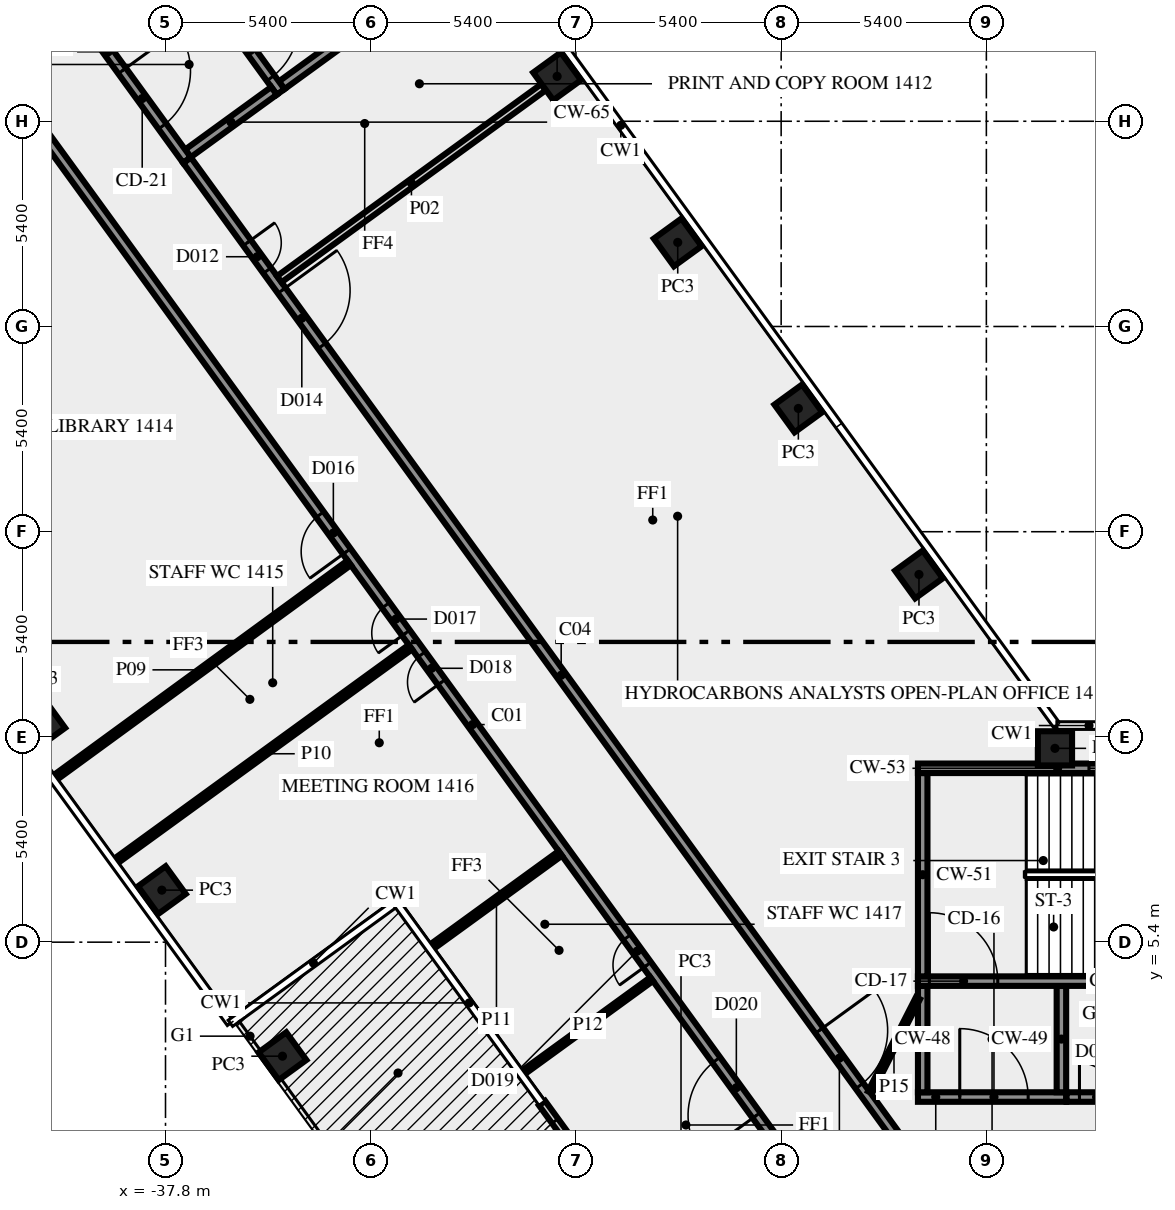
"""IFC4 building model, lengths in metres.
Left out: names, types, materials, properties, quantities, classifications, styles, units other than length and angle.
Written with IfcOpenShell. Run it as: python <this file> out.ifc"""

import sys

from ifc_helpers import new_model, si_unit, direction, frame, frame_2d, origin, origin_2d, place, context, subcontext, project, spatial, rectangle, extrude, element, fill, save


model = new_model("IFC4")
c1 = context("Model", 3, precision=1e-05, world=origin(), true_north=direction((0.0, 1.0)))
c2 = subcontext(c1, "Body", "Model", "MODEL_VIEW")
j1 = project(units=[si_unit("LENGTHUNIT", "METRE"), si_unit("PLANEANGLEUNIT", "RADIAN")], contexts=[c1])
p1 = place(None, origin())
s1 = spatial("IfcSite", under=j1, at=p1, CompositionType="ELEMENT")
p2 = place(p1, origin())
s2 = spatial("IfcBuilding", under=s1, at=p2, CompositionType="ELEMENT")
p3 = place(p2, frame((0.0, 0.0, 63.0)))
s3 = spatial("IfcBuildingStorey", under=s2, at=p3, CompositionType="ELEMENT", Elevation=63.0)
for number, where, z_axis, x_axis in (
    (1, (-17.974, 15.075, 0.0), (0.0, 0.0, 1.0), (-0.588, 0.809, 0.0)),
    (2, (-21.147, 19.444, 0.0), (0.0, 0.0, 1.0), (-0.588, 0.809, 0.0)),
    (3, (-24.321, 23.812, 0.0), (0.0, 0.0, 1.0), (-0.588, 0.809, 0.0)),
    (4, (-27.495, 28.181, 0.0), (0.0, 0.0, 1.0), (-0.588, 0.809, 0.0)),
    (5, (-41.07, 11.137, 0.0), (0.0, 0.0, 1.0), (0.588, -0.809, 0.0)),
    (6, (-37.896, 6.769, 0.0), (0.0, 0.0, 1.0), (0.588, -0.809, 0.0)),
    (7, (-34.722, 2.4, 0.0), (0.0, 0.0, 1.0), (0.588, -0.809, 0.0)),
    (8, (-14.395, 10.5, 0.0), (0.0, 0.0, 1.0), (-1.0, 0.0, 0.0)),
):
    element("IfcColumn", number, at=place(p3, frame(where, z_axis=z_axis, x_axis=x_axis)), inside=s3, PredefinedType="COLUMN", context=c2, shape_type="SweptSolid", body=[
        extrude(rectangle(XDim=0.9, YDim=0.9, at=origin_2d()), origin(), (0.0, 0.0, 1.0), 3.65),
    ])
p4 = place(p3, frame((-26.15, -1.232, 0.0), z_axis=(0.0, 0.0, 1.0), x_axis=(-0.58782869016, 0.808985433135, 0.0)))
e9 = element("IfcWall", 9, at=p4, inside=s3, PredefinedType="SOLIDWALL", context=c2, shape_type="SweptSolid", body=[
    extrude(rectangle(XDim=2.963, YDim=0.2, at=frame_2d((1.481, 0.0))), origin(), (0.0, 0.0, 1.0), 3.65),
])
p5 = place(p4, frame((0.582, 0.0, 0.0)))
e10 = element("IfcOpeningElement", 10, at=p5, cuts=e9, PredefinedType="OPENING", context=c2, shape_type="SweptSolid", body=[
    extrude(rectangle(XDim=1.8, YDim=2.4, at=frame_2d((0.9, 1.2))), frame((0.0, 0.11, 0.0), z_axis=(0.0, -1.0, 0.0), x_axis=(1.0, 0.0, 0.0)), (0.0, 0.0, 1.0), 0.22),
])
p6 = place(p3, frame((-18.0, 1.325, 0.0), z_axis=(0.0, 0.0, 1.0), x_axis=(1.0, 0.0, 0.0)))
e11 = element("IfcWall", 11, at=p6, inside=s3, PredefinedType="SHEAR", context=c2, shape_type="SweptSolid", body=[
    extrude(rectangle(XDim=3.9, YDim=0.25, at=frame_2d((1.95, 0.0))), origin(), (0.0, 0.0, 1.0), 3.65),
])
p7 = place(p6, frame((1.1, 0.0, 0.0)))
e12 = element("IfcOpeningElement", 12, at=p7, cuts=e11, PredefinedType="OPENING", context=c2, shape_type="SweptSolid", body=[
    extrude(rectangle(XDim=1.8, YDim=2.1, at=frame_2d((0.9, 1.05))), frame((0.0, 0.135, 0.0), z_axis=(0.0, -1.0, 0.0), x_axis=(1.0, 0.0, 0.0)), (0.0, 0.0, 1.0), 0.27),
])
for number, where, z_axis, x_axis in (
    (13, (-17.875, 1.45, 0.0), (0.0, 0.0, 1.0), (0.0, 1.0, 0.0)),
    (14, (-14.225, 1.45, 0.0), (0.0, 0.0, 1.0), (0.0, 1.0, 0.0)),
):
    element("IfcWall", number, at=place(p3, frame(where, z_axis=z_axis, x_axis=x_axis)), inside=s3, PredefinedType="SHEAR", context=c2, shape_type="SweptSolid", body=[
        extrude(rectangle(XDim=2.8, YDim=0.25, at=frame_2d((1.4, 0.0))), origin(), (0.0, 0.0, 1.0), 3.65),
    ])
p8 = place(p3, frame((-18.0, 4.375, 0.0), z_axis=(0.0, 0.0, 1.0), x_axis=(1.0, 0.0, 0.0)))
e15 = element("IfcWall", 15, at=p8, inside=s3, PredefinedType="SHEAR", context=c2, shape_type="SweptSolid", body=[
    extrude(rectangle(XDim=10.5, YDim=0.25, at=frame_2d((5.25, 0.0))), origin(), (0.0, 0.0, 1.0), 3.65),
])
p9 = place(p8, frame((0.3, 0.0, 0.0)))
e16 = element("IfcOpeningElement", 16, at=p9, cuts=e15, PredefinedType="OPENING", context=c2, shape_type="SweptSolid", body=[
    extrude(rectangle(XDim=1.8, YDim=2.1, at=frame_2d((0.9, 1.05))), frame((0.0, 0.135, 0.0), z_axis=(0.0, -1.0, 0.0), x_axis=(1.0, 0.0, 0.0)), (0.0, 0.0, 1.0), 0.27),
])
p10 = place(p3, frame((-17.875, 4.5, 0.0), z_axis=(0.0, 0.0, 1.0), x_axis=(0.0, 1.0, 0.0)))
e17 = element("IfcWall", 17, at=p10, inside=s3, PredefinedType="SHEAR", context=c2, shape_type="SweptSolid", body=[
    extrude(rectangle(XDim=5.35, YDim=0.25, at=frame_2d((2.675, 0.0))), origin(), (0.0, 0.0, 1.0), 3.65),
])
p11 = place(p3, frame((-18.0, 9.975, 0.0), z_axis=(0.0, 0.0, 1.0), x_axis=(1.0, 0.0, 0.0)))
e18 = element("IfcWall", 18, at=p11, inside=s3, PredefinedType="SHEAR", context=c2, shape_type="SweptSolid", body=[
    extrude(rectangle(XDim=10.5, YDim=0.25, at=frame_2d((5.25, 0.0))), origin(), (0.0, 0.0, 1.0), 3.65),
])
p12 = place(p11, frame((4.5, 0.0, 1.0)))
e19 = element("IfcOpeningElement", 19, at=p12, cuts=e18, PredefinedType="OPENING", context=c2, shape_type="SweptSolid", body=[
    extrude(rectangle(XDim=1.2, YDim=1.2, at=frame_2d((0.6, 0.6))), frame((0.0, 0.135, 0.0), z_axis=(0.0, -1.0, 0.0), x_axis=(1.0, 0.0, 0.0)), (0.0, 0.0, 1.0), 0.27),
])
p13 = place(p3, frame((-30.414, 31.092, 0.0), z_axis=(0.0, 0.0, 1.0), x_axis=(-0.8089984606, -0.587810760999, 0.0)))
e20 = element("IfcWall", 20, at=p13, inside=s3, PredefinedType="SHEAR", context=c2, shape_type="SweptSolid", body=[
    extrude(rectangle(XDim=5.35, YDim=0.25, at=frame_2d((2.675, 0.0))), origin(), (0.0, 0.0, 1.0), 3.65),
])
p14 = place(p3, frame((-40.942, 36.267, 0.0), z_axis=(0.0, 0.0, 1.0), x_axis=(0.587795589702, -0.809009483706, 0.0)))
e21 = element("IfcWall", 21, at=p14, inside=s3, PredefinedType="SHEAR", context=c2, shape_type="SweptSolid", body=[
    extrude(rectangle(XDim=10.5, YDim=0.25, at=frame_2d((5.25, 0.0))), origin(), (0.0, 0.0, 1.0), 3.65),
])
p15 = place(p14, frame((8.25, 0.0, 0.0)))
e22 = element("IfcOpeningElement", 22, at=p15, cuts=e21, PredefinedType="OPENING", context=c2, shape_type="SweptSolid", body=[
    extrude(rectangle(XDim=1.8, YDim=2.1, at=frame_2d((0.9, 1.05))), frame((0.0, 0.135, 0.0), z_axis=(0.0, -1.0, 0.0), x_axis=(1.0, 0.0, 0.0)), (0.0, 0.0, 1.0), 0.27),
])
p16 = place(p3, frame((-34.945, 27.8, 0.0), z_axis=(0.0, 0.0, 1.0), x_axis=(-0.809041377956, -0.587751689708, 0.0)))
e23 = element("IfcWall", 23, at=p16, inside=s3, PredefinedType="SHEAR", context=c2, shape_type="SweptSolid", body=[
    extrude(rectangle(XDim=2.8, YDim=0.25, at=frame_2d((1.4, 0.0))), origin(), (0.0, 0.0, 1.0), 3.65),
])
p17 = place(p3, frame((-39.589, 29.216, 0.0), z_axis=(0.0, 0.0, 1.0), x_axis=(0.587772420479, -0.809026317077, 0.0)))
e24 = element("IfcWall", 24, at=p17, inside=s3, PredefinedType="SHEAR", context=c2, shape_type="SweptSolid", body=[
    extrude(rectangle(XDim=4.0, YDim=0.25, at=frame_2d((2.0, 0.0))), origin(), (0.0, 0.0, 1.0), 3.65),
])
p18 = place(p17, frame((1.1, 0.0, 0.0)))
e25 = element("IfcOpeningElement", 25, at=p18, cuts=e24, PredefinedType="OPENING", context=c2, shape_type="SweptSolid", body=[
    extrude(rectangle(XDim=1.8, YDim=2.1, at=frame_2d((0.9, 1.05))), frame((0.0, 0.135, 0.0), z_axis=(0.0, -1.0, 0.0), x_axis=(1.0, 0.0, 0.0)), (0.0, 0.0, 1.0), 0.27),
])
p19 = place(p3, frame((-20.531, -1.523, 0.0), z_axis=(0.0, 0.0, 1.0), x_axis=(-0.587784593204, 0.809017473231, 0.0)))
e26 = element("IfcWall", 26, at=p19, inside=s3, PredefinedType="SOLIDWALL", context=c2, shape_type="SweptSolid", body=[
    extrude(rectangle(XDim=44.67, YDim=0.25, at=frame_2d((22.335, 0.0))), origin(), (0.0, 0.0, 1.0), 3.65),
])
p20 = place(p19, frame((43.046, 0.0, 0.0)))
e27 = element("IfcOpeningElement", 27, at=p20, cuts=e26, PredefinedType="OPENING", context=c2, shape_type="SweptSolid", body=[
    extrude(rectangle(XDim=1.2, YDim=2.1, at=frame_2d((0.6, 1.05))), frame((0.0, 0.135, 0.0), z_axis=(0.0, -1.0, 0.0), x_axis=(1.0, 0.0, 0.0)), (0.0, 0.0, 1.0), 0.27),
])
p21 = place(p19, frame((21.266, 0.0, 0.0)))
e28 = element("IfcOpeningElement", 28, at=p21, cuts=e26, PredefinedType="OPENING", context=c2, shape_type="SweptSolid", body=[
    extrude(rectangle(XDim=1.2, YDim=2.1, at=frame_2d((0.6, 1.05))), frame((0.0, 0.135, 0.0), z_axis=(0.0, -1.0, 0.0), x_axis=(1.0, 0.0, 0.0)), (0.0, 0.0, 1.0), 0.27),
])
p22 = place(p19, frame((17.015, 0.0, 0.0)))
e29 = element("IfcOpeningElement", 29, at=p22, cuts=e26, PredefinedType="OPENING", context=c2, shape_type="SweptSolid", body=[
    extrude(rectangle(XDim=0.9, YDim=2.1, at=frame_2d((0.45, 1.05))), frame((0.0, 0.135, 0.0), z_axis=(0.0, -1.0, 0.0), x_axis=(1.0, 0.0, 0.0)), (0.0, 0.0, 1.0), 0.27),
])
p23 = place(p19, frame((2.924, 0.0, 0.0)))
e30 = element("IfcOpeningElement", 30, at=p23, cuts=e26, PredefinedType="OPENING", context=c2, shape_type="SweptSolid", body=[
    extrude(rectangle(XDim=1.8, YDim=2.1, at=frame_2d((0.9, 1.05))), frame((0.0, 0.135, 0.0), z_axis=(0.0, -1.0, 0.0), x_axis=(1.0, 0.0, 0.0)), (0.0, 0.0, 1.0), 0.27),
])
p24 = place(p19, frame((18.616, 0.0, 0.0)))
e31 = element("IfcOpeningElement", 31, at=p24, cuts=e26, PredefinedType="OPENING", context=c2, shape_type="SweptSolid", body=[
    extrude(rectangle(XDim=0.9, YDim=2.1, at=frame_2d((0.45, 1.05))), frame((0.0, 0.135, 0.0), z_axis=(0.0, -1.0, 0.0), x_axis=(1.0, 0.0, 0.0)), (0.0, 0.0, 1.0), 0.27),
])
p25 = place(p19, frame((7.816, 0.0, 0.0)))
e32 = element("IfcOpeningElement", 32, at=p25, cuts=e26, PredefinedType="OPENING", context=c2, shape_type="SweptSolid", body=[
    extrude(rectangle(XDim=0.9, YDim=2.1, at=frame_2d((0.45, 1.05))), frame((0.0, 0.135, 0.0), z_axis=(0.0, -1.0, 0.0), x_axis=(1.0, 0.0, 0.0)), (0.0, 0.0, 1.0), 0.27),
])
p26 = place(p3, frame((-37.232, 25.972, 0.0), z_axis=(0.0, 0.0, 1.0), x_axis=(0.587786323093, -0.809016216391, 0.0)))
e33 = element("IfcWall", 33, at=p26, inside=s3, PredefinedType="SOLIDWALL", context=c2, shape_type="SweptSolid", body=[
    extrude(rectangle(XDim=33.493, YDim=0.25, at=frame_2d((16.747, 0.0))), origin(), (0.0, 0.0, 1.0), 3.65),
])
p27 = place(p26, frame((28.301, 0.0, 0.0)))
e34 = element("IfcOpeningElement", 34, at=p27, cuts=e33, PredefinedType="OPENING", context=c2, shape_type="SweptSolid", body=[
    extrude(rectangle(XDim=1.8, YDim=2.1, at=frame_2d((0.9, 1.05))), frame((0.0, 0.135, 0.0), z_axis=(0.0, -1.0, 0.0), x_axis=(1.0, 0.0, 0.0)), (0.0, 0.0, 1.0), 0.27),
])
p28 = place(p26, frame((4.235, 0.0, 0.0)))
e35 = element("IfcOpeningElement", 35, at=p28, cuts=e33, PredefinedType="OPENING", context=c2, shape_type="SweptSolid", body=[
    extrude(rectangle(XDim=1.8, YDim=2.1, at=frame_2d((0.9, 1.05))), frame((0.0, 0.135, 0.0), z_axis=(0.0, -1.0, 0.0), x_axis=(1.0, 0.0, 0.0)), (0.0, 0.0, 1.0), 0.27),
])
p29 = place(p26, frame((2.685, 0.0, 0.0)))
e36 = element("IfcOpeningElement", 36, at=p29, cuts=e33, PredefinedType="OPENING", context=c2, shape_type="SweptSolid", body=[
    extrude(rectangle(XDim=0.9, YDim=2.1, at=frame_2d((0.45, 1.05))), frame((0.0, 0.135, 0.0), z_axis=(0.0, -1.0, 0.0), x_axis=(1.0, 0.0, 0.0)), (0.0, 0.0, 1.0), 0.27),
])
p30 = place(p3, frame((-14.09, 1.325, 0.0), z_axis=(0.0, 0.0, 1.0), x_axis=(1.0, 0.0, 0.0)))
e37 = element("IfcWall", 37, at=p30, inside=s3, PredefinedType="SOLIDWALL", context=c2, shape_type="SweptSolid", body=[
    extrude(rectangle(XDim=28.18, YDim=0.25, at=frame_2d((14.09, 0.0))), origin(), (0.0, 0.0, 1.0), 3.65),
])
p31 = place(p30, frame((26.94, 0.0, 0.0)))
e38 = element("IfcOpeningElement", 38, at=p31, cuts=e37, PredefinedType="OPENING", context=c2, shape_type="SweptSolid", body=[
    extrude(rectangle(XDim=0.9, YDim=2.1, at=frame_2d((0.45, 1.05))), frame((0.0, 0.135, 0.0), z_axis=(0.0, -1.0, 0.0), x_axis=(1.0, 0.0, 0.0)), (0.0, 0.0, 1.0), 0.27),
])
p32 = place(p30, frame((0.34, 0.0, 0.0)))
e39 = element("IfcOpeningElement", 39, at=p32, cuts=e37, PredefinedType="OPENING", context=c2, shape_type="SweptSolid", body=[
    extrude(rectangle(XDim=0.9, YDim=2.1, at=frame_2d((0.45, 1.05))), frame((0.0, 0.135, 0.0), z_axis=(0.0, -1.0, 0.0), x_axis=(1.0, 0.0, 0.0)), (0.0, 0.0, 1.0), 0.27),
])
p33 = place(p30, frame((14.44, 0.0, 0.0)))
e40 = element("IfcOpeningElement", 40, at=p33, cuts=e37, PredefinedType="OPENING", context=c2, shape_type="SweptSolid", body=[
    extrude(rectangle(XDim=0.9, YDim=2.1, at=frame_2d((0.45, 1.05))), frame((0.0, 0.135, 0.0), z_axis=(0.0, -1.0, 0.0), x_axis=(1.0, 0.0, 0.0)), (0.0, 0.0, 1.0), 0.27),
])
p34 = place(p3, frame((-27.851, 27.897, 0.0), z_axis=(0.0, 0.0, 1.0), x_axis=(-0.809030728677, -0.587766348183, 0.0)))
e41 = element("IfcWall", 41, at=p34, inside=s3, PredefinedType="SOLIDWALL", context=c2, shape_type="SweptSolid", body=[
    extrude(rectangle(XDim=8.596, YDim=0.2, at=frame_2d((4.298, 0.0))), origin(), (0.0, 0.0, 1.0), 3.65),
])
p35 = place(p3, frame((-40.68, 9.75, 0.0), z_axis=(0.0, 0.0, 1.0), x_axis=(0.807645841498, 0.589667868135, 0.0)))
e42 = element("IfcWall", 42, at=p35, inside=s3, PredefinedType="PARTITIONING", context=c2, shape_type="SweptSolid", body=[
    extrude(rectangle(XDim=9.551, YDim=0.15, at=frame_2d((4.775, 0.0))), origin(), (0.0, 0.0, 1.0), 2.75),
])
p36 = place(p3, frame((-31.356, 13.164, 0.0), z_axis=(0.0, 0.0, 1.0), x_axis=(-0.809102944047, -0.587666934526, 0.0)))
e43 = element("IfcWall", 43, at=p36, inside=s3, PredefinedType="PARTITIONING", context=c2, shape_type="SweptSolid", body=[
    extrude(rectangle(XDim=9.55, YDim=0.15, at=frame_2d((4.775, 0.0))), origin(), (0.0, 0.0, 1.0), 2.75),
])
p37 = place(p3, frame((-30.77, 5.296, 0.0), z_axis=(0.0, 0.0, 1.0), x_axis=(0.80906417205, 0.587720312313, 0.0)))
e44 = element("IfcWall", 44, at=p37, inside=s3, PredefinedType="PARTITIONING", context=c2, shape_type="SweptSolid", body=[
    extrude(rectangle(XDim=4.149, YDim=0.15, at=frame_2d((2.075, 0.0))), origin(), (0.0, 0.0, 1.0), 3.65),
])
p38 = place(p3, frame((-25.008, 4.427, 0.0), z_axis=(0.0, 0.0, 1.0), x_axis=(-0.809020893444, -0.587779885646, 0.0)))
e45 = element("IfcWall", 45, at=p38, inside=s3, PredefinedType="PARTITIONING", context=c2, shape_type="SweptSolid", body=[
    extrude(rectangle(XDim=4.15, YDim=0.12, at=frame_2d((2.075, 0.0))), origin(), (0.0, 0.0, 1.0), 3.65),
])
p39 = place(p3, frame((-19.261, 1.45, 0.0), z_axis=(0.0, 0.0, 1.0), x_axis=(0.453950796792, 0.891026752736, 0.0)))
e46 = element("IfcWall", 46, at=p39, inside=s3, PredefinedType="PARTITIONING", context=c2, shape_type="SweptSolid", body=[
    extrude(rectangle(XDim=2.778, YDim=0.12, at=frame_2d((1.389, 0.0))), origin(), (0.0, 0.0, 1.0), 3.65),
])
p40 = place(p5, origin())
e47 = element("IfcDoor", 47, at=p40, inside=s3, OperationType="DOUBLE_DOOR_SINGLE_SWING", PredefinedType="DOOR", context=c2, shape_type="SweptSolid", body=[
    extrude(rectangle(XDim=1.8, YDim=2.4, at=frame_2d((0.9, 1.2))), frame((0.0, 0.025, 0.0), z_axis=(0.0, -1.0, 0.0), x_axis=(1.0, 0.0, 0.0)), (0.0, 0.0, 1.0), 0.05),
])
fill(e10, e47)
p41 = place(p7, origin())
e48 = element("IfcDoor", 48, at=p41, inside=s3, OperationType="DOUBLE_DOOR_SINGLE_SWING", PredefinedType="DOOR", context=c2, shape_type="SweptSolid", body=[
    extrude(rectangle(XDim=1.8, YDim=2.1, at=frame_2d((0.9, 1.05))), frame((0.0, 0.025, 0.0), z_axis=(0.0, -1.0, 0.0), x_axis=(1.0, 0.0, 0.0)), (0.0, 0.0, 1.0), 0.05),
])
fill(e12, e48)
p42 = place(p9, origin())
e49 = element("IfcDoor", 49, at=p42, inside=s3, OperationType="DOUBLE_DOOR_SINGLE_SWING", PredefinedType="DOOR", context=c2, shape_type="SweptSolid", body=[
    extrude(rectangle(XDim=1.8, YDim=2.1, at=frame_2d((0.9, 1.05))), frame((0.0, 0.025, 0.0), z_axis=(0.0, -1.0, 0.0), x_axis=(1.0, 0.0, 0.0)), (0.0, 0.0, 1.0), 0.05),
])
fill(e16, e49)
p43 = place(p12, origin())
e50 = element("IfcWindow", 50, at=p43, inside=s3, PartitioningType="SINGLE_PANEL", PredefinedType="WINDOW", context=c2, shape_type="SweptSolid", body=[
    extrude(rectangle(XDim=1.2, YDim=1.2, at=frame_2d((0.6, 0.6))), frame((0.0, 0.03, 0.0), z_axis=(0.0, -1.0, 0.0), x_axis=(1.0, 0.0, 0.0)), (0.0, 0.0, 1.0), 0.06),
])
fill(e19, e50)
p44 = place(p15, origin())
e51 = element("IfcDoor", 51, at=p44, inside=s3, OperationType="DOUBLE_DOOR_SINGLE_SWING", PredefinedType="DOOR", context=c2, shape_type="SweptSolid", body=[
    extrude(rectangle(XDim=1.8, YDim=2.1, at=frame_2d((0.9, 1.05))), frame((0.0, 0.025, 0.0), z_axis=(0.0, -1.0, 0.0), x_axis=(1.0, 0.0, 0.0)), (0.0, 0.0, 1.0), 0.05),
])
fill(e22, e51)
p45 = place(p18, origin())
e52 = element("IfcDoor", 52, at=p45, inside=s3, OperationType="DOUBLE_DOOR_SINGLE_SWING", PredefinedType="DOOR", context=c2, shape_type="SweptSolid", body=[
    extrude(rectangle(XDim=1.8, YDim=2.1, at=frame_2d((0.9, 1.05))), frame((0.0, 0.025, 0.0), z_axis=(0.0, -1.0, 0.0), x_axis=(1.0, 0.0, 0.0)), (0.0, 0.0, 1.0), 0.05),
])
fill(e25, e52)
p46 = place(p27, origin())
e53 = element("IfcDoor", 53, at=p46, inside=s3, OperationType="DOUBLE_DOOR_SINGLE_SWING", PredefinedType="DOOR", context=c2, shape_type="SweptSolid", body=[
    extrude(rectangle(XDim=1.8, YDim=2.1, at=frame_2d((0.9, 1.05))), frame((0.0, 0.025, 0.0), z_axis=(0.0, -1.0, 0.0), x_axis=(1.0, 0.0, 0.0)), (0.0, 0.0, 1.0), 0.05),
])
fill(e34, e53)
p47 = place(p28, origin())
e54 = element("IfcDoor", 54, at=p47, inside=s3, OperationType="DOUBLE_DOOR_SINGLE_SWING", PredefinedType="DOOR", context=c2, shape_type="SweptSolid", body=[
    extrude(rectangle(XDim=1.8, YDim=2.1, at=frame_2d((0.9, 1.05))), frame((0.0, 0.025, 0.0), z_axis=(0.0, -1.0, 0.0), x_axis=(1.0, 0.0, 0.0)), (0.0, 0.0, 1.0), 0.05),
])
fill(e35, e54)
p48 = place(p21, origin())
e55 = element("IfcDoor", 55, at=p48, inside=s3, OperationType="SINGLE_SWING_LEFT", PredefinedType="DOOR", context=c2, shape_type="SweptSolid", body=[
    extrude(rectangle(XDim=1.2, YDim=2.1, at=frame_2d((0.6, 1.05))), frame((0.0, 0.025, 0.0), z_axis=(0.0, -1.0, 0.0), x_axis=(1.0, 0.0, 0.0)), (0.0, 0.0, 1.0), 0.05),
])
fill(e28, e55)
p49 = place(p22, origin())
e56 = element("IfcDoor", 56, at=p49, inside=s3, OperationType="SINGLE_SWING_RIGHT", PredefinedType="DOOR", context=c2, shape_type="SweptSolid", body=[
    extrude(rectangle(XDim=0.9, YDim=2.1, at=frame_2d((0.45, 1.05))), frame((0.0, 0.025, 0.0), z_axis=(0.0, -1.0, 0.0), x_axis=(1.0, 0.0, 0.0)), (0.0, 0.0, 1.0), 0.05),
])
fill(e29, e56)
p50 = place(p29, origin())
e57 = element("IfcDoor", 57, at=p50, inside=s3, OperationType="SINGLE_SWING_RIGHT", PredefinedType="DOOR", context=c2, shape_type="SweptSolid", body=[
    extrude(rectangle(XDim=0.9, YDim=2.1, at=frame_2d((0.45, 1.05))), frame((0.0, 0.025, 0.0), z_axis=(0.0, -1.0, 0.0), x_axis=(1.0, 0.0, 0.0)), (0.0, 0.0, 1.0), 0.05),
])
fill(e36, e57)
p51 = place(p23, origin())
e58 = element("IfcDoor", 58, at=p51, inside=s3, OperationType="DOUBLE_DOOR_SINGLE_SWING", PredefinedType="DOOR", context=c2, shape_type="SweptSolid", body=[
    extrude(rectangle(XDim=1.8, YDim=2.1, at=frame_2d((0.9, 1.05))), frame((0.0, 0.025, 0.0), z_axis=(0.0, -1.0, 0.0), x_axis=(1.0, 0.0, 0.0)), (0.0, 0.0, 1.0), 0.05),
])
fill(e30, e58)
p52 = place(p32, origin())
e59 = element("IfcDoor", 59, at=p52, inside=s3, OperationType="SINGLE_SWING_LEFT", PredefinedType="DOOR", context=c2, shape_type="SweptSolid", body=[
    extrude(rectangle(XDim=0.9, YDim=2.1, at=frame_2d((0.45, 1.05))), frame((0.0, 0.025, 0.0), z_axis=(0.0, -1.0, 0.0), x_axis=(1.0, 0.0, 0.0)), (0.0, 0.0, 1.0), 0.05),
])
fill(e39, e59)
p53 = place(p24, origin())
e60 = element("IfcDoor", 60, at=p53, inside=s3, OperationType="SINGLE_SWING_LEFT", PredefinedType="DOOR", context=c2, shape_type="SweptSolid", body=[
    extrude(rectangle(XDim=0.9, YDim=2.1, at=frame_2d((0.45, 1.05))), frame((0.0, 0.025, 0.0), z_axis=(0.0, -1.0, 0.0), x_axis=(1.0, 0.0, 0.0)), (0.0, 0.0, 1.0), 0.05),
])
fill(e31, e60)
p54 = place(p25, origin())
e61 = element("IfcDoor", 61, at=p54, inside=s3, OperationType="SINGLE_SWING_LEFT", PredefinedType="DOOR", context=c2, shape_type="SweptSolid", body=[
    extrude(rectangle(XDim=0.9, YDim=2.1, at=frame_2d((0.45, 1.05))), frame((0.0, 0.025, 0.0), z_axis=(0.0, -1.0, 0.0), x_axis=(1.0, 0.0, 0.0)), (0.0, 0.0, 1.0), 0.05),
])
fill(e32, e61)
save(model, sys.argv[1])
